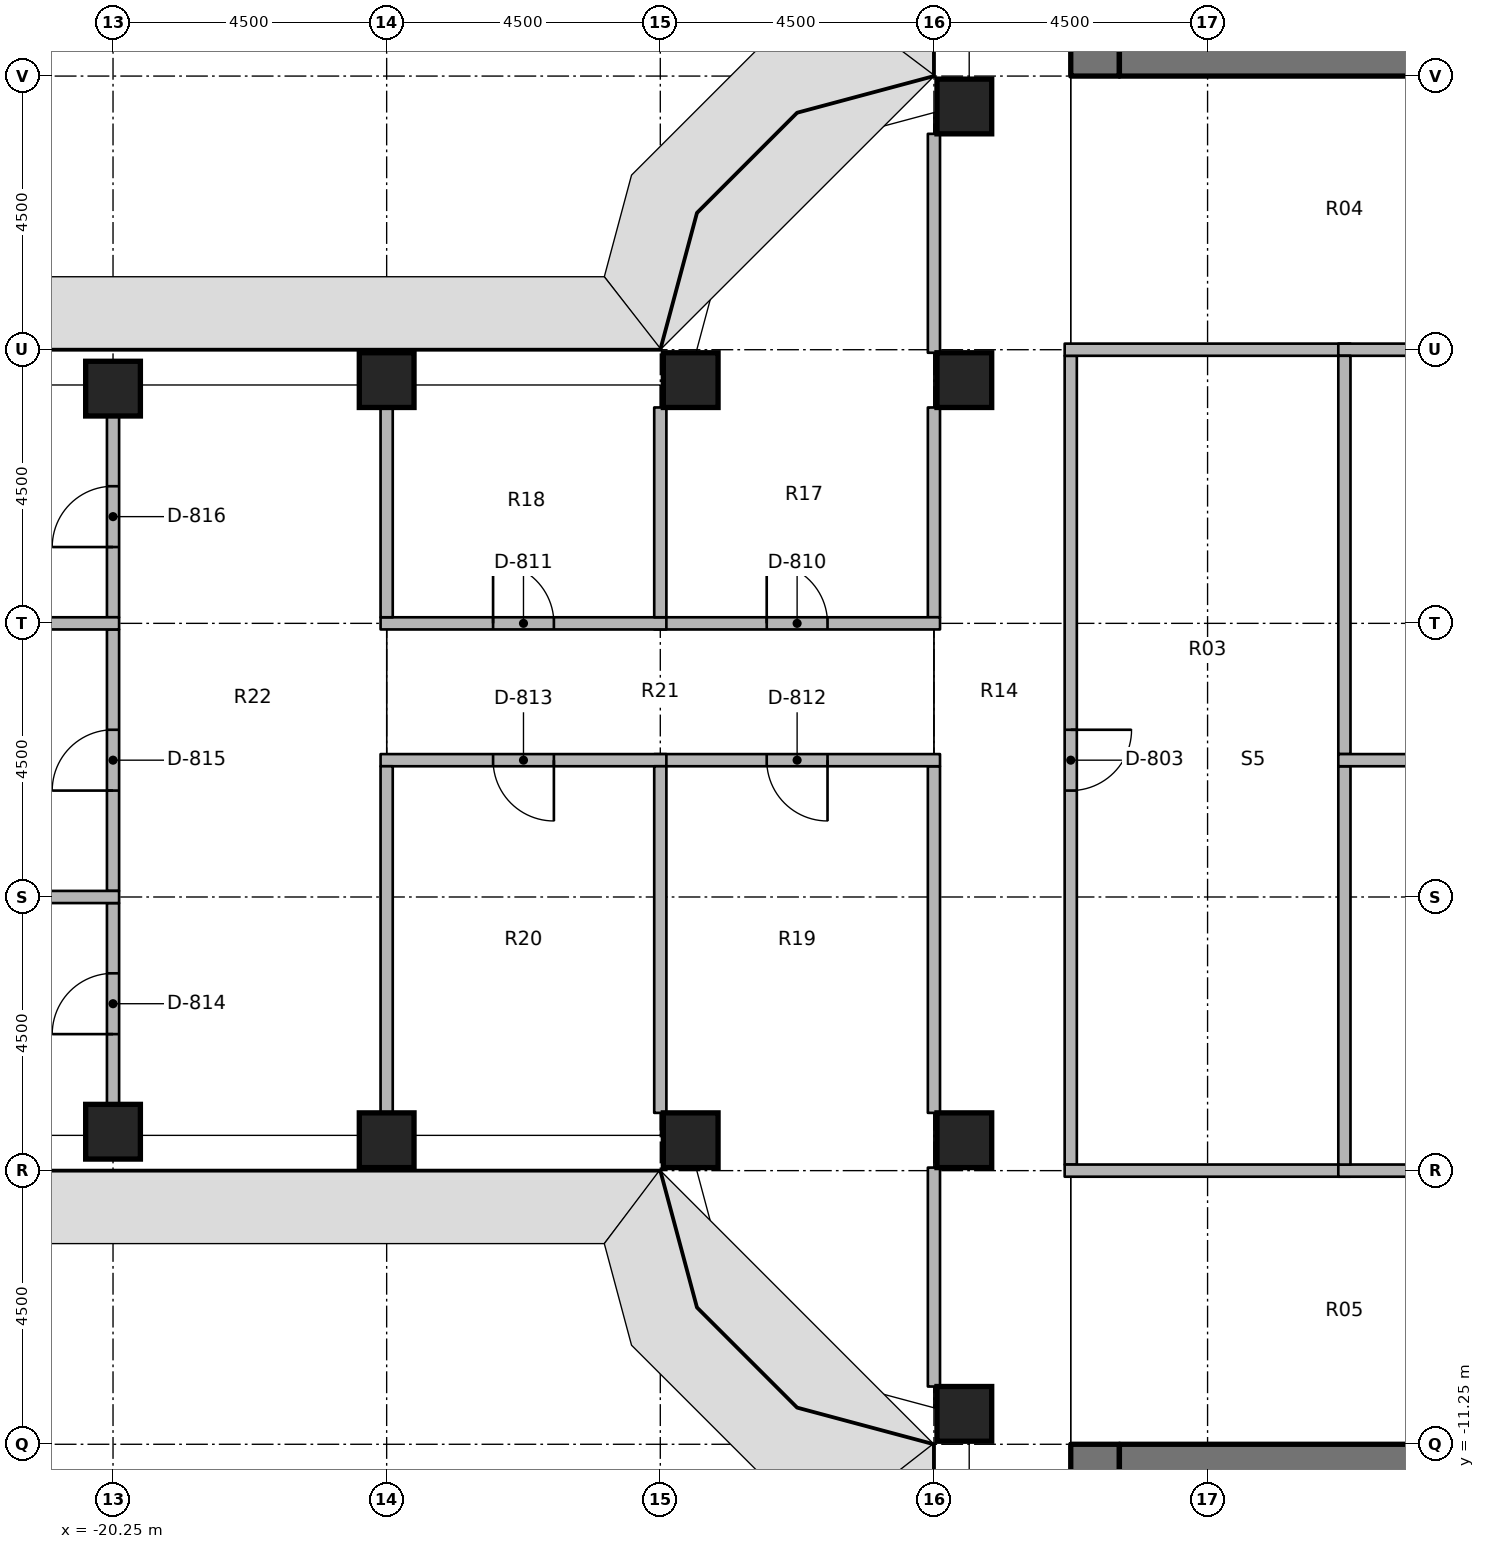
"""IFC4 building model, lengths in metres.
Left out: names, types, materials, properties, quantities, classifications, styles, units other than length and angle.
Written with IfcOpenShell. Run it as: python <this file> out.ifc"""

import sys

from ifc_helpers import new_model, si_unit, direction, frame, frame_2d, origin, origin_2d, place, context, subcontext, project, spatial, rectangle, extrude, element, fill, save


model = new_model("IFC4")
c1 = context("Model", 3, precision=1e-05, world=origin(), true_north=direction((0.0, 1.0)))
c2 = subcontext(c1, "Body", "Model", "MODEL_VIEW")
j1 = project(units=[si_unit("LENGTHUNIT", "METRE"), si_unit("PLANEANGLEUNIT", "RADIAN")], contexts=[c1])
p1 = place(None, origin())
s1 = spatial("IfcSite", under=j1, at=p1, CompositionType="ELEMENT")
p2 = place(p1, origin())
s2 = spatial("IfcBuilding", under=s1, at=p2, CompositionType="ELEMENT")
p3 = place(p2, frame((0.0, 0.0, 98.0)))
s3 = spatial("IfcBuildingStorey", under=s2, at=p3, CompositionType="ELEMENT", Elevation=98.0)
for number, where, z_axis, x_axis in (
    (1, (-20.25, -6.11, 0.0), (0.0, 0.0, 1.0), (1.0, 0.0, 0.0)),
    (2, (-20.25, 6.11, 0.0), (0.0, 0.0, 1.0), (1.0, 0.0, 0.0)),
    (3, (-15.75, -6.25, 0.0), (0.0, 0.0, 1.0), (1.0, 0.0, 0.0)),
    (4, (-15.75, 6.25, 0.0), (0.0, 0.0, 1.0), (1.0, 0.0, 0.0)),
    (5, (-10.75, -6.25, 0.0), (0.0, 0.0, 1.0), (1.0, 0.0, 0.0)),
    (6, (-10.75, 6.25, 0.0), (0.0, 0.0, 1.0), (1.0, 0.0, 0.0)),
    (7, (-6.25, -10.75, 0.0), (0.0, 0.0, 1.0), (1.0, 0.0, 0.0)),
    (8, (-6.25, -6.25, 0.0), (0.0, 0.0, 1.0), (1.0, 0.0, 0.0)),
    (9, (-6.25, 6.25, 0.0), (0.0, 0.0, 1.0), (1.0, 0.0, 0.0)),
    (10, (-6.25, 10.75, 0.0), (0.0, 0.0, 1.0), (1.0, 0.0, 0.0)),
):
    element("IfcColumn", number, at=place(p3, frame(where, z_axis=z_axis, x_axis=x_axis)), inside=s3, PredefinedType="COLUMN", context=c2, shape_type="SweptSolid", body=[
        extrude(rectangle(XDim=0.9, YDim=0.9, at=origin_2d()), origin(), (0.0, 0.0, 1.0), 3.65),
    ])
p4 = place(p3, frame((-4.1, 11.25, 0.0), z_axis=(0.0, 0.0, 1.0), x_axis=(0.0, 1.0, 0.0)))
e11 = element("IfcWall", 11, at=p4, inside=s3, PredefinedType="SHEAR", context=c2, shape_type="SweptSolid", body=[
    extrude(rectangle(XDim=15.0, YDim=0.8, at=frame_2d((7.5, 0.0))), origin(), (0.0, 0.0, 1.0), 3.8),
])
p5 = place(p4, frame((7.15, 0.0, 0.0)))
e12 = element("IfcOpeningElement", 12, at=p5, cuts=e11, PredefinedType="OPENING", context=c2, shape_type="SweptSolid", body=[
    extrude(rectangle(XDim=1.5, YDim=2.3, at=frame_2d((0.75, 1.15))), frame((0.0, 0.41, 0.0), z_axis=(0.0, -1.0, 0.0), x_axis=(1.0, 0.0, 0.0)), (0.0, 0.0, 1.0), 0.82),
])
p6 = place(p4, frame((13.9, 0.0, 0.0)))
e13 = element("IfcOpeningElement", 13, at=p6, cuts=e11, PredefinedType="OPENING", context=c2, shape_type="SweptSolid", body=[
    extrude(rectangle(XDim=0.9, YDim=2.1, at=frame_2d((0.45, 1.05))), frame((0.0, 0.41, 0.0), z_axis=(0.0, -1.0, 0.0), x_axis=(1.0, 0.0, 0.0)), (0.0, 0.0, 1.0), 0.82),
])
p7 = place(p4, frame((1.15, 0.0, 0.0)))
e14 = element("IfcOpeningElement", 14, at=p7, cuts=e11, PredefinedType="OPENING", context=c2, shape_type="SweptSolid", body=[
    extrude(rectangle(XDim=1.2, YDim=2.1, at=frame_2d((0.6, 1.05))), frame((0.0, 0.41, 0.0), z_axis=(0.0, -1.0, 0.0), x_axis=(1.0, 0.0, 0.0)), (0.0, 0.0, 1.0), 0.82),
])
p8 = place(p3, frame((-3.7, 11.65, 0.0), z_axis=(0.0, 0.0, 1.0), x_axis=(1.0, 0.0, 0.0)))
e15 = element("IfcWall", 15, at=p8, inside=s3, PredefinedType="SHEAR", context=c2, shape_type="SweptSolid", body=[
    extrude(rectangle(XDim=7.4, YDim=0.8, at=frame_2d((3.7, 0.0))), origin(), (0.0, 0.0, 1.0), 3.8),
])
p9 = place(p3, frame((-4.1, -11.25, 0.0), z_axis=(0.0, 0.0, 1.0), x_axis=(0.0, -1.0, 0.0)))
e16 = element("IfcWall", 16, at=p9, inside=s3, PredefinedType="SHEAR", context=c2, shape_type="SweptSolid", body=[
    extrude(rectangle(XDim=15.0, YDim=0.8, at=frame_2d((7.5, 0.0))), origin(), (0.0, 0.0, 1.0), 3.8),
])
p10 = place(p9, frame((7.15, 0.0, 0.0)))
e17 = element("IfcOpeningElement", 17, at=p10, cuts=e16, PredefinedType="OPENING", context=c2, shape_type="SweptSolid", body=[
    extrude(rectangle(XDim=1.5, YDim=2.3, at=frame_2d((0.75, 1.15))), frame((0.0, 0.41, 0.0), z_axis=(0.0, -1.0, 0.0), x_axis=(1.0, 0.0, 0.0)), (0.0, 0.0, 1.0), 0.82),
])
p11 = place(p9, frame((5.55, 0.0, 0.0)))
e18 = element("IfcOpeningElement", 18, at=p11, cuts=e16, PredefinedType="OPENING", context=c2, shape_type="SweptSolid", body=[
    extrude(rectangle(XDim=1.2, YDim=2.1, at=frame_2d((0.6, 1.05))), frame((0.0, 0.41, 0.0), z_axis=(0.0, -1.0, 0.0), x_axis=(1.0, 0.0, 0.0)), (0.0, 0.0, 1.0), 0.82),
])
p12 = place(p3, frame((-3.7, -11.65, 0.0), z_axis=(0.0, 0.0, 1.0), x_axis=(1.0, 0.0, 0.0)))
e19 = element("IfcWall", 19, at=p12, inside=s3, PredefinedType="SHEAR", context=c2, shape_type="SweptSolid", body=[
    extrude(rectangle(XDim=7.4, YDim=0.8, at=frame_2d((3.7, 0.0))), origin(), (0.0, 0.0, 1.0), 3.8),
])
p13 = place(p3, frame((-4.5, 6.65, 0.0), z_axis=(0.0, 0.0, 1.0), x_axis=(0.0, -1.0, 0.0)))
e20 = element("IfcWall", 20, at=p13, inside=s3, PredefinedType="PARTITIONING", context=c2, shape_type="SweptSolid", body=[
    extrude(rectangle(XDim=13.3, YDim=0.2, at=frame_2d((6.65, 0.0))), origin(), (0.0, 0.0, 1.0), 2.738),
])
p14 = place(p13, frame((6.15, 0.0, 0.0)))
e21 = element("IfcOpeningElement", 21, at=p14, cuts=e20, PredefinedType="OPENING", context=c2, shape_type="SweptSolid", body=[
    extrude(rectangle(XDim=1.0, YDim=2.1, at=frame_2d((0.5, 1.05))), frame((0.0, 0.11, 0.0), z_axis=(0.0, -1.0, 0.0), x_axis=(1.0, 0.0, 0.0)), (0.0, 0.0, 1.0), 0.22),
])
p15 = place(p3, frame((-6.75, 2.35, 0.0), z_axis=(0.0, 0.0, 1.0), x_axis=(0.0, 1.0, 0.0)))
e22 = element("IfcWall", 22, at=p15, inside=s3, PredefinedType="PARTITIONING", context=c2, shape_type="SweptSolid", body=[
    extrude(rectangle(XDim=3.45, YDim=0.2, at=frame_2d((1.725, 0.0))), origin(), (0.0, 0.0, 1.0), 2.738),
])
for number, where, z_axis, x_axis in (
    (23, (-6.75, 6.7, 0.0), (0.0, 0.0, 1.0), (0.0, 1.0, 0.0)),
    (24, (-6.75, -10.3, 0.0), (0.0, 0.0, 1.0), (0.0, 1.0, 0.0)),
):
    element("IfcWall", number, at=place(p3, frame(where, z_axis=z_axis, x_axis=x_axis)), inside=s3, PredefinedType="PARTITIONING", context=c2, shape_type="SweptSolid", body=[
        extrude(rectangle(XDim=3.6, YDim=0.2, at=frame_2d((1.8, 0.0))), origin(), (0.0, 0.0, 1.0), 2.738),
    ])
p16 = place(p3, frame((-6.75, -5.8, 0.0), z_axis=(0.0, 0.0, 1.0), x_axis=(0.0, 1.0, 0.0)))
e25 = element("IfcWall", 25, at=p16, inside=s3, PredefinedType="PARTITIONING", context=c2, shape_type="SweptSolid", body=[
    extrude(rectangle(XDim=5.7, YDim=0.2, at=frame_2d((2.85, 0.0))), origin(), (0.0, 0.0, 1.0), 2.738),
])
for number, where, z_axis, x_axis in (
    (26, (-4.6, 6.75, 0.0), (0.0, 0.0, 1.0), (1.0, 0.0, 0.0)),
    (27, (-0.1, 6.75, 0.0), (0.0, 0.0, 1.0), (1.0, 0.0, 0.0)),
    (28, (-4.6, -6.75, 0.0), (0.0, 0.0, 1.0), (1.0, 0.0, 0.0)),
    (29, (-0.1, -6.75, 0.0), (0.0, 0.0, 1.0), (1.0, 0.0, 0.0)),
):
    element("IfcWall", number, at=place(p3, frame(where, z_axis=z_axis, x_axis=x_axis)), inside=s3, PredefinedType="PARTITIONING", context=c2, shape_type="SweptSolid", body=[
        extrude(rectangle(XDim=4.7, YDim=0.2, at=frame_2d((2.35, 0.0))), origin(), (0.0, 0.0, 1.0), 2.738),
    ])
for number, where, z_axis, x_axis in (
    (30, (0.0, 0.1, 0.0), (0.0, 0.0, 1.0), (0.0, 1.0, 0.0)),
    (31, (0.0, -6.65, 0.0), (0.0, 0.0, 1.0), (0.0, 1.0, 0.0)),
):
    element("IfcWall", number, at=place(p3, frame(where, z_axis=z_axis, x_axis=x_axis)), inside=s3, PredefinedType="PARTITIONING", context=c2, shape_type="SweptSolid", body=[
        extrude(rectangle(XDim=6.55, YDim=0.2, at=frame_2d((3.275, 0.0))), origin(), (0.0, 0.0, 1.0), 2.738),
    ])
p17 = place(p3, frame((-0.1, 0.0, 0.0), z_axis=(0.0, 0.0, 1.0), x_axis=(1.0, 0.0, 0.0)))
e32 = element("IfcWall", 32, at=p17, inside=s3, PredefinedType="PARTITIONING", context=c2, shape_type="SweptSolid", body=[
    extrude(rectangle(XDim=4.7, YDim=0.2, at=frame_2d((2.35, 0.0))), origin(), (0.0, 0.0, 1.0), 2.738),
])
p18 = place(p3, frame((-11.35, 2.25, 0.0), z_axis=(0.0, 0.0, 1.0), x_axis=(1.0, 0.0, 0.0)))
e33 = element("IfcWall", 33, at=p18, inside=s3, PredefinedType="PARTITIONING", context=c2, shape_type="SweptSolid", body=[
    extrude(rectangle(XDim=4.7, YDim=0.2, at=frame_2d((2.35, 0.0))), origin(), (0.0, 0.0, 1.0), 2.738),
])
p19 = place(p18, frame((1.85, 0.0, 0.0)))
e34 = element("IfcOpeningElement", 34, at=p19, cuts=e33, PredefinedType="OPENING", context=c2, shape_type="SweptSolid", body=[
    extrude(rectangle(XDim=1.0, YDim=2.1, at=frame_2d((0.5, 1.05))), frame((0.0, 0.11, 0.0), z_axis=(0.0, -1.0, 0.0), x_axis=(1.0, 0.0, 0.0)), (0.0, 0.0, 1.0), 0.22),
])
p20 = place(p3, frame((-6.65, 0.0, 0.0), z_axis=(0.0, 0.0, 1.0), x_axis=(-1.0, 0.0, 0.0)))
e35 = element("IfcWall", 35, at=p20, inside=s3, PredefinedType="PARTITIONING", context=c2, shape_type="SweptSolid", body=[
    extrude(rectangle(XDim=4.7, YDim=0.2, at=frame_2d((2.35, 0.0))), origin(), (0.0, 0.0, 1.0), 2.738),
])
p21 = place(p20, frame((1.85, 0.0, 0.0)))
e36 = element("IfcOpeningElement", 36, at=p21, cuts=e35, PredefinedType="OPENING", context=c2, shape_type="SweptSolid", body=[
    extrude(rectangle(XDim=1.0, YDim=2.1, at=frame_2d((0.5, 1.05))), frame((0.0, 0.11, 0.0), z_axis=(0.0, -1.0, 0.0), x_axis=(1.0, 0.0, 0.0)), (0.0, 0.0, 1.0), 0.22),
])
p22 = place(p3, frame((-15.85, 2.25, 0.0), z_axis=(0.0, 0.0, 1.0), x_axis=(1.0, 0.0, 0.0)))
e37 = element("IfcWall", 37, at=p22, inside=s3, PredefinedType="PARTITIONING", context=c2, shape_type="SweptSolid", body=[
    extrude(rectangle(XDim=4.7, YDim=0.2, at=frame_2d((2.35, 0.0))), origin(), (0.0, 0.0, 1.0), 2.738),
])
p23 = place(p22, frame((1.85, 0.0, 0.0)))
e38 = element("IfcOpeningElement", 38, at=p23, cuts=e37, PredefinedType="OPENING", context=c2, shape_type="SweptSolid", body=[
    extrude(rectangle(XDim=1.0, YDim=2.1, at=frame_2d((0.5, 1.05))), frame((0.0, 0.11, 0.0), z_axis=(0.0, -1.0, 0.0), x_axis=(1.0, 0.0, 0.0)), (0.0, 0.0, 1.0), 0.22),
])
p24 = place(p3, frame((-11.15, 0.0, 0.0), z_axis=(0.0, 0.0, 1.0), x_axis=(-1.0, 0.0, 0.0)))
e39 = element("IfcWall", 39, at=p24, inside=s3, PredefinedType="PARTITIONING", context=c2, shape_type="SweptSolid", body=[
    extrude(rectangle(XDim=4.7, YDim=0.2, at=frame_2d((2.35, 0.0))), origin(), (0.0, 0.0, 1.0), 2.738),
])
p25 = place(p24, frame((1.85, 0.0, 0.0)))
e40 = element("IfcOpeningElement", 40, at=p25, cuts=e39, PredefinedType="OPENING", context=c2, shape_type="SweptSolid", body=[
    extrude(rectangle(XDim=1.0, YDim=2.1, at=frame_2d((0.5, 1.05))), frame((0.0, 0.11, 0.0), z_axis=(0.0, -1.0, 0.0), x_axis=(1.0, 0.0, 0.0)), (0.0, 0.0, 1.0), 0.22),
])
p26 = place(p3, frame((-11.25, 2.35, 0.0), z_axis=(0.0, 0.0, 1.0), x_axis=(0.0, 1.0, 0.0)))
e41 = element("IfcWall", 41, at=p26, inside=s3, PredefinedType="PARTITIONING", context=c2, shape_type="SweptSolid", body=[
    extrude(rectangle(XDim=3.45, YDim=0.2, at=frame_2d((1.725, 0.0))), origin(), (0.0, 0.0, 1.0), 2.738),
])
p27 = place(p3, frame((-11.25, -5.8, 0.0), z_axis=(0.0, 0.0, 1.0), x_axis=(0.0, 1.0, 0.0)))
e42 = element("IfcWall", 42, at=p27, inside=s3, PredefinedType="PARTITIONING", context=c2, shape_type="SweptSolid", body=[
    extrude(rectangle(XDim=5.7, YDim=0.2, at=frame_2d((2.85, 0.0))), origin(), (0.0, 0.0, 1.0), 2.738),
])
p28 = place(p3, frame((-15.75, 2.35, 0.0), z_axis=(0.0, 0.0, 1.0), x_axis=(0.0, 1.0, 0.0)))
e43 = element("IfcWall", 43, at=p28, inside=s3, PredefinedType="PARTITIONING", context=c2, shape_type="SweptSolid", body=[
    extrude(rectangle(XDim=3.45, YDim=0.2, at=frame_2d((1.725, 0.0))), origin(), (0.0, 0.0, 1.0), 2.738),
])
p29 = place(p3, frame((-15.75, -5.8, 0.0), z_axis=(0.0, 0.0, 1.0), x_axis=(0.0, 1.0, 0.0)))
e44 = element("IfcWall", 44, at=p29, inside=s3, PredefinedType="PARTITIONING", context=c2, shape_type="SweptSolid", body=[
    extrude(rectangle(XDim=5.7, YDim=0.2, at=frame_2d((2.85, 0.0))), origin(), (0.0, 0.0, 1.0), 2.738),
])
p30 = place(p3, frame((-20.25, -5.66, 0.0), z_axis=(0.0, 0.0, 1.0), x_axis=(0.0, 1.0, 0.0)))
e45 = element("IfcWall", 45, at=p30, inside=s3, PredefinedType="PARTITIONING", context=c2, shape_type="SweptSolid", body=[
    extrude(rectangle(XDim=3.31, YDim=0.2, at=frame_2d((1.655, 0.0))), origin(), (0.0, 0.0, 1.0), 2.738),
])
p31 = place(p30, frame((1.155, 0.0, 0.0)))
e46 = element("IfcOpeningElement", 46, at=p31, cuts=e45, PredefinedType="OPENING", context=c2, shape_type="SweptSolid", body=[
    extrude(rectangle(XDim=1.0, YDim=2.1, at=frame_2d((0.5, 1.05))), frame((0.0, 0.11, 0.0), z_axis=(0.0, -1.0, 0.0), x_axis=(1.0, 0.0, 0.0)), (0.0, 0.0, 1.0), 0.22),
])
p32 = place(p3, frame((-20.25, -2.15, 0.0), z_axis=(0.0, 0.0, 1.0), x_axis=(0.0, 1.0, 0.0)))
e47 = element("IfcWall", 47, at=p32, inside=s3, PredefinedType="PARTITIONING", context=c2, shape_type="SweptSolid", body=[
    extrude(rectangle(XDim=4.3, YDim=0.2, at=frame_2d((2.15, 0.0))), origin(), (0.0, 0.0, 1.0), 2.738),
])
p33 = place(p32, frame((1.65, 0.0, 0.0)))
e48 = element("IfcOpeningElement", 48, at=p33, cuts=e47, PredefinedType="OPENING", context=c2, shape_type="SweptSolid", body=[
    extrude(rectangle(XDim=1.0, YDim=2.1, at=frame_2d((0.5, 1.05))), frame((0.0, 0.11, 0.0), z_axis=(0.0, -1.0, 0.0), x_axis=(1.0, 0.0, 0.0)), (0.0, 0.0, 1.0), 0.22),
])
p34 = place(p3, frame((-20.25, 2.35, 0.0), z_axis=(0.0, 0.0, 1.0), x_axis=(0.0, 1.0, 0.0)))
e49 = element("IfcWall", 49, at=p34, inside=s3, PredefinedType="PARTITIONING", context=c2, shape_type="SweptSolid", body=[
    extrude(rectangle(XDim=3.31, YDim=0.2, at=frame_2d((1.655, 0.0))), origin(), (0.0, 0.0, 1.0), 2.738),
])
p35 = place(p34, frame((1.155, 0.0, 0.0)))
e50 = element("IfcOpeningElement", 50, at=p35, cuts=e49, PredefinedType="OPENING", context=c2, shape_type="SweptSolid", body=[
    extrude(rectangle(XDim=1.0, YDim=2.1, at=frame_2d((0.5, 1.05))), frame((0.0, 0.11, 0.0), z_axis=(0.0, -1.0, 0.0), x_axis=(1.0, 0.0, 0.0)), (0.0, 0.0, 1.0), 0.22),
])
for number, where, z_axis, x_axis in (
    (51, (-32.66, -2.25, 0.0), (0.0, 0.0, 1.0), (1.0, 0.0, 0.0)),
    (52, (-32.66, 2.25, 0.0), (0.0, 0.0, 1.0), (1.0, 0.0, 0.0)),
):
    element("IfcWall", number, at=place(p3, frame(where, z_axis=z_axis, x_axis=x_axis)), inside=s3, PredefinedType="PARTITIONING", context=c2, shape_type="SweptSolid", body=[
        extrude(rectangle(XDim=12.51, YDim=0.2, at=frame_2d((6.255, 0.0))), origin(), (0.0, 0.0, 1.0), 2.738),
    ])
p36 = place(p14, origin())
e53 = element("IfcDoor", 53, at=p36, inside=s3, OperationType="SINGLE_SWING_RIGHT", PredefinedType="DOOR", context=c2, shape_type="SweptSolid", body=[
    extrude(rectangle(XDim=1.0, YDim=2.1, at=frame_2d((0.5, 1.05))), frame((0.0, 0.025, 0.0), z_axis=(0.0, -1.0, 0.0), x_axis=(1.0, 0.0, 0.0)), (0.0, 0.0, 1.0), 0.05),
])
fill(e21, e53)
p37 = place(p19, origin())
e54 = element("IfcDoor", 54, at=p37, inside=s3, OperationType="SINGLE_SWING_RIGHT", PredefinedType="DOOR", context=c2, shape_type="SweptSolid", body=[
    extrude(rectangle(XDim=1.0, YDim=2.1, at=frame_2d((0.5, 1.05))), frame((0.0, 0.025, 0.0), z_axis=(0.0, -1.0, 0.0), x_axis=(1.0, 0.0, 0.0)), (0.0, 0.0, 1.0), 0.05),
])
fill(e34, e54)
p38 = place(p23, origin())
e55 = element("IfcDoor", 55, at=p38, inside=s3, OperationType="SINGLE_SWING_RIGHT", PredefinedType="DOOR", context=c2, shape_type="SweptSolid", body=[
    extrude(rectangle(XDim=1.0, YDim=2.1, at=frame_2d((0.5, 1.05))), frame((0.0, 0.025, 0.0), z_axis=(0.0, -1.0, 0.0), x_axis=(1.0, 0.0, 0.0)), (0.0, 0.0, 1.0), 0.05),
])
fill(e38, e55)
p39 = place(p21, origin())
e56 = element("IfcDoor", 56, at=p39, inside=s3, OperationType="SINGLE_SWING_RIGHT", PredefinedType="DOOR", context=c2, shape_type="SweptSolid", body=[
    extrude(rectangle(XDim=1.0, YDim=2.1, at=frame_2d((0.5, 1.05))), frame((0.0, 0.025, 0.0), z_axis=(0.0, -1.0, 0.0), x_axis=(1.0, 0.0, 0.0)), (0.0, 0.0, 1.0), 0.05),
])
fill(e36, e56)
p40 = place(p25, origin())
e57 = element("IfcDoor", 57, at=p40, inside=s3, OperationType="SINGLE_SWING_RIGHT", PredefinedType="DOOR", context=c2, shape_type="SweptSolid", body=[
    extrude(rectangle(XDim=1.0, YDim=2.1, at=frame_2d((0.5, 1.05))), frame((0.0, 0.025, 0.0), z_axis=(0.0, -1.0, 0.0), x_axis=(1.0, 0.0, 0.0)), (0.0, 0.0, 1.0), 0.05),
])
fill(e40, e57)
p41 = place(p31, origin())
e58 = element("IfcDoor", 58, at=p41, inside=s3, OperationType="SINGLE_SWING_RIGHT", PredefinedType="DOOR", context=c2, shape_type="SweptSolid", body=[
    extrude(rectangle(XDim=1.0, YDim=2.1, at=frame_2d((0.5, 1.05))), frame((0.0, 0.025, 0.0), z_axis=(0.0, -1.0, 0.0), x_axis=(1.0, 0.0, 0.0)), (0.0, 0.0, 1.0), 0.05),
])
fill(e46, e58)
p42 = place(p33, origin())
e59 = element("IfcDoor", 59, at=p42, inside=s3, OperationType="SINGLE_SWING_RIGHT", PredefinedType="DOOR", context=c2, shape_type="SweptSolid", body=[
    extrude(rectangle(XDim=1.0, YDim=2.1, at=frame_2d((0.5, 1.05))), frame((0.0, 0.025, 0.0), z_axis=(0.0, -1.0, 0.0), x_axis=(1.0, 0.0, 0.0)), (0.0, 0.0, 1.0), 0.05),
])
fill(e48, e59)
p43 = place(p35, origin())
e60 = element("IfcDoor", 60, at=p43, inside=s3, OperationType="SINGLE_SWING_LEFT", PredefinedType="DOOR", context=c2, shape_type="SweptSolid", body=[
    extrude(rectangle(XDim=1.0, YDim=2.1, at=frame_2d((0.5, 1.05))), frame((0.0, 0.025, 0.0), z_axis=(0.0, -1.0, 0.0), x_axis=(1.0, 0.0, 0.0)), (0.0, 0.0, 1.0), 0.05),
])
fill(e50, e60)
save(model, sys.argv[1])
